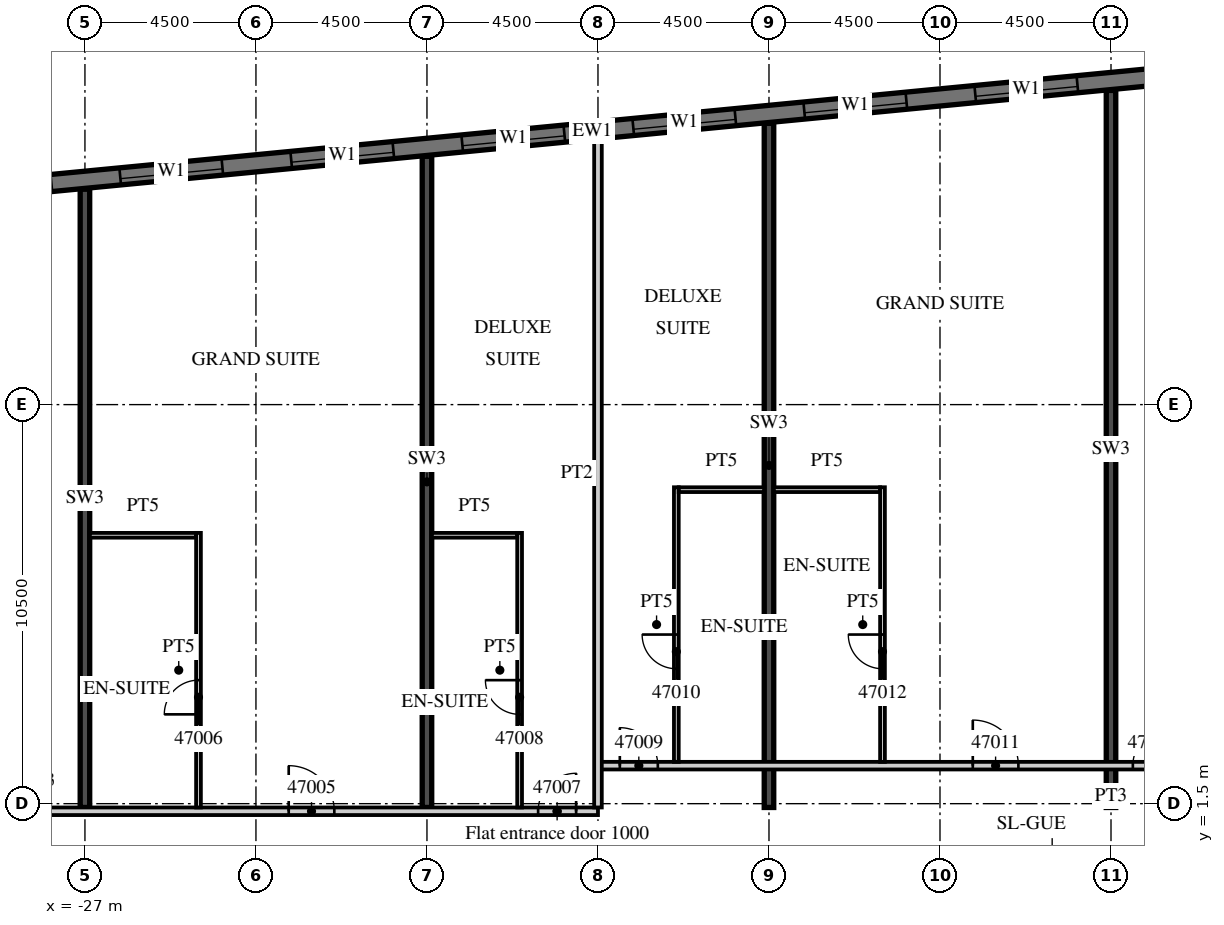
"""IFC4 building model, lengths in metres.
Left out: names, types, materials, properties, quantities, classifications, styles, units other than length and angle.
Written with IfcOpenShell. Run it as: python <this file> out.ifc"""

import sys

from ifc_helpers import new_model, si_unit, direction, frame, frame_2d, origin, place, context, subcontext, project, spatial, rectangle, extrude, element, fill, save


model = new_model("IFC4")
c1 = context("Model", 3, precision=1e-05, world=origin(), true_north=direction((0.0, 1.0)))
c2 = subcontext(c1, "Body", "Model", "MODEL_VIEW")
j1 = project(units=[si_unit("LENGTHUNIT", "METRE"), si_unit("PLANEANGLEUNIT", "RADIAN")], contexts=[c1])
p1 = place(None, origin())
s1 = spatial("IfcSite", under=j1, at=p1, CompositionType="ELEMENT")
p2 = place(p1, origin())
s2 = spatial("IfcBuilding", under=s1, at=p2, CompositionType="ELEMENT")
p3 = place(p2, frame((0.0, 0.0, 196.6)))
s3 = spatial("IfcBuildingStorey", under=s2, at=p3, CompositionType="ELEMENT", Elevation=196.6)
p4 = place(p3, frame((-27.0, 1.4, 0.0), z_axis=(0.0, 0.0, 1.0), x_axis=(0.0, 1.0, 0.0)))
e1 = element("IfcWall", 1, at=p4, inside=s3, PredefinedType="SHEAR", context=c2, shape_type="SweptSolid", body=[
    extrude(rectangle(XDim=16.268, YDim=0.25, at=frame_2d((8.134, 0.0))), origin(), (0.0, 0.0, 1.0), 3.3),
])
p5 = place(p3, frame((-18.0, 1.4, 0.0), z_axis=(0.0, 0.0, 1.0), x_axis=(0.0, 1.0, 0.0)))
e2 = element("IfcWall", 2, at=p5, inside=s3, PredefinedType="SHEAR", context=c2, shape_type="SweptSolid", body=[
    extrude(rectangle(XDim=17.134, YDim=0.25, at=frame_2d((8.567, 0.0))), origin(), (0.0, 0.0, 1.0), 3.3),
])
p6 = place(p3, frame((-9.0, 1.4, 0.0), z_axis=(0.0, 0.0, 1.0), x_axis=(0.0, 1.0, 0.0)))
e3 = element("IfcWall", 3, at=p6, inside=s3, PredefinedType="SHEAR", context=c2, shape_type="SweptSolid", body=[
    extrude(rectangle(XDim=18.001, YDim=0.25, at=frame_2d((9.0, 0.0))), origin(), (0.0, 0.0, 1.0), 3.3),
])
p7 = place(p3, frame((0.0, 1.4, 0.0), z_axis=(0.0, 0.0, 1.0), x_axis=(0.0, 1.0, 0.0)))
e4 = element("IfcWall", 4, at=p7, inside=s3, PredefinedType="SHEAR", context=c2, shape_type="SweptSolid", body=[
    extrude(rectangle(XDim=18.867, YDim=0.25, at=frame_2d((9.434, 0.0))), origin(), (0.0, 0.0, 1.0), 3.3),
])
p8 = place(p3, frame((13.521, 21.817, 0.0), z_axis=(0.0, 0.0, 1.0), x_axis=(-0.995396508751, -0.095842529008, 0.0)))
e5 = element("IfcWall", 5, at=p8, inside=s3, PredefinedType="SOLIDWALL", context=c2, shape_type="SweptSolid", body=[
    extrude(rectangle(XDim=54.591, YDim=0.45, at=frame_2d((27.296, 0.0))), origin(), (0.0, 0.0, 1.0), 3.02),
])
p9 = place(p8, frame((0.91, 0.0, 0.45)))
e6 = element("IfcOpeningElement", 6, at=p9, cuts=e5, PredefinedType="OPENING", context=c2, shape_type="SweptSolid", body=[
    extrude(rectangle(XDim=2.7, YDim=2.25, at=frame_2d((1.35, 1.125))), frame((0.0, 0.235, 0.0), z_axis=(0.0, -1.0, 0.0), x_axis=(1.0, 0.0, 0.0)), (0.0, 0.0, 1.0), 0.47),
])
p10 = place(p8, frame((5.431, 0.0, 0.45)))
e7 = element("IfcOpeningElement", 7, at=p10, cuts=e5, PredefinedType="OPENING", context=c2, shape_type="SweptSolid", body=[
    extrude(rectangle(XDim=2.7, YDim=2.25, at=frame_2d((1.35, 1.125))), frame((0.0, 0.235, 0.0), z_axis=(0.0, -1.0, 0.0), x_axis=(1.0, 0.0, 0.0)), (0.0, 0.0, 1.0), 0.47),
])
p11 = place(p8, frame((9.952, 0.0, 0.45)))
e8 = element("IfcOpeningElement", 8, at=p11, cuts=e5, PredefinedType="OPENING", context=c2, shape_type="SweptSolid", body=[
    extrude(rectangle(XDim=2.7, YDim=2.25, at=frame_2d((1.35, 1.125))), frame((0.0, 0.235, 0.0), z_axis=(0.0, -1.0, 0.0), x_axis=(1.0, 0.0, 0.0)), (0.0, 0.0, 1.0), 0.47),
])
p12 = place(p8, frame((14.473, 0.0, 0.45)))
e9 = element("IfcOpeningElement", 9, at=p12, cuts=e5, PredefinedType="OPENING", context=c2, shape_type="SweptSolid", body=[
    extrude(rectangle(XDim=2.7, YDim=2.25, at=frame_2d((1.35, 1.125))), frame((0.0, 0.235, 0.0), z_axis=(0.0, -1.0, 0.0), x_axis=(1.0, 0.0, 0.0)), (0.0, 0.0, 1.0), 0.47),
])
p13 = place(p8, frame((18.994, 0.0, 0.45)))
e10 = element("IfcOpeningElement", 10, at=p13, cuts=e5, PredefinedType="OPENING", context=c2, shape_type="SweptSolid", body=[
    extrude(rectangle(XDim=2.7, YDim=2.25, at=frame_2d((1.35, 1.125))), frame((0.0, 0.235, 0.0), z_axis=(0.0, -1.0, 0.0), x_axis=(1.0, 0.0, 0.0)), (0.0, 0.0, 1.0), 0.47),
])
p14 = place(p8, frame((23.514, 0.0, 0.45)))
e11 = element("IfcOpeningElement", 11, at=p14, cuts=e5, PredefinedType="OPENING", context=c2, shape_type="SweptSolid", body=[
    extrude(rectangle(XDim=2.7, YDim=2.25, at=frame_2d((1.35, 1.125))), frame((0.0, 0.235, 0.0), z_axis=(0.0, -1.0, 0.0), x_axis=(1.0, 0.0, 0.0)), (0.0, 0.0, 1.0), 0.47),
])
p15 = place(p8, frame((28.035, 0.0, 0.45)))
e12 = element("IfcOpeningElement", 12, at=p15, cuts=e5, PredefinedType="OPENING", context=c2, shape_type="SweptSolid", body=[
    extrude(rectangle(XDim=2.7, YDim=2.25, at=frame_2d((1.35, 1.125))), frame((0.0, 0.235, 0.0), z_axis=(0.0, -1.0, 0.0), x_axis=(1.0, 0.0, 0.0)), (0.0, 0.0, 1.0), 0.47),
])
p16 = place(p8, frame((32.556, 0.0, 0.45)))
e13 = element("IfcOpeningElement", 13, at=p16, cuts=e5, PredefinedType="OPENING", context=c2, shape_type="SweptSolid", body=[
    extrude(rectangle(XDim=2.7, YDim=2.25, at=frame_2d((1.35, 1.125))), frame((0.0, 0.235, 0.0), z_axis=(0.0, -1.0, 0.0), x_axis=(1.0, 0.0, 0.0)), (0.0, 0.0, 1.0), 0.47),
])
p17 = place(p8, frame((37.077, 0.0, 0.45)))
e14 = element("IfcOpeningElement", 14, at=p17, cuts=e5, PredefinedType="OPENING", context=c2, shape_type="SweptSolid", body=[
    extrude(rectangle(XDim=2.7, YDim=2.25, at=frame_2d((1.35, 1.125))), frame((0.0, 0.235, 0.0), z_axis=(0.0, -1.0, 0.0), x_axis=(1.0, 0.0, 0.0)), (0.0, 0.0, 1.0), 0.47),
])
p18 = place(p8, frame((41.598, 0.0, 0.45)))
e15 = element("IfcOpeningElement", 15, at=p18, cuts=e5, PredefinedType="OPENING", context=c2, shape_type="SweptSolid", body=[
    extrude(rectangle(XDim=2.7, YDim=2.25, at=frame_2d((1.35, 1.125))), frame((0.0, 0.235, 0.0), z_axis=(0.0, -1.0, 0.0), x_axis=(1.0, 0.0, 0.0)), (0.0, 0.0, 1.0), 0.47),
])
p19 = place(p8, frame((46.118, 0.0, 0.45)))
e16 = element("IfcOpeningElement", 16, at=p19, cuts=e5, PredefinedType="OPENING", context=c2, shape_type="SweptSolid", body=[
    extrude(rectangle(XDim=2.7, YDim=2.25, at=frame_2d((1.35, 1.125))), frame((0.0, 0.235, 0.0), z_axis=(0.0, -1.0, 0.0), x_axis=(1.0, 0.0, 0.0)), (0.0, 0.0, 1.0), 0.47),
])
p20 = place(p8, frame((50.629, 0.0, 0.45)))
e17 = element("IfcOpeningElement", 17, at=p20, cuts=e5, PredefinedType="OPENING", context=c2, shape_type="SweptSolid", body=[
    extrude(rectangle(XDim=2.7, YDim=2.25, at=frame_2d((1.35, 1.125))), frame((0.0, 0.235, 0.0), z_axis=(0.0, -1.0, 0.0), x_axis=(1.0, 0.0, 0.0)), (0.0, 0.0, 1.0), 0.47),
])
p21 = place(p3, frame((-42.913, 1.3, 0.0), z_axis=(0.0, 0.0, 1.0), x_axis=(1.0, 0.0, 0.0)))
e18 = element("IfcWall", 18, at=p21, inside=s3, PredefinedType="PARTITIONING", context=c2, shape_type="SweptSolid", body=[
    extrude(rectangle(XDim=29.413, YDim=0.2, at=frame_2d((14.707, 0.0))), origin(), (0.0, 0.0, 1.0), 3.02),
])
p22 = place(p21, frame((1.406, 0.0, 0.0)))
e19 = element("IfcOpeningElement", 19, at=p22, cuts=e18, PredefinedType="OPENING", context=c2, shape_type="SweptSolid", body=[
    extrude(rectangle(XDim=1.2, YDim=2.1, at=frame_2d((0.6, 1.05))), frame((0.0, 0.11, 0.0), z_axis=(0.0, -1.0, 0.0), x_axis=(1.0, 0.0, 0.0)), (0.0, 0.0, 1.0), 0.22),
])
p23 = place(p21, frame((12.275, 0.0, 0.0)))
e20 = element("IfcOpeningElement", 20, at=p23, cuts=e18, PredefinedType="OPENING", context=c2, shape_type="SweptSolid", body=[
    extrude(rectangle(XDim=1.2, YDim=2.1, at=frame_2d((0.6, 1.05))), frame((0.0, 0.11, 0.0), z_axis=(0.0, -1.0, 0.0), x_axis=(1.0, 0.0, 0.0)), (0.0, 0.0, 1.0), 0.22),
])
p24 = place(p21, frame((21.275, 0.0, 0.0)))
e21 = element("IfcOpeningElement", 21, at=p24, cuts=e18, PredefinedType="OPENING", context=c2, shape_type="SweptSolid", body=[
    extrude(rectangle(XDim=1.2, YDim=2.1, at=frame_2d((0.6, 1.05))), frame((0.0, 0.11, 0.0), z_axis=(0.0, -1.0, 0.0), x_axis=(1.0, 0.0, 0.0)), (0.0, 0.0, 1.0), 0.22),
])
p25 = place(p21, frame((27.838, 0.0, 0.0)))
e22 = element("IfcOpeningElement", 22, at=p25, cuts=e18, PredefinedType="OPENING", context=c2, shape_type="SweptSolid", body=[
    extrude(rectangle(XDim=1.0, YDim=2.1, at=frame_2d((0.5, 1.05))), frame((0.0, 0.11, 0.0), z_axis=(0.0, -1.0, 0.0), x_axis=(1.0, 0.0, 0.0)), (0.0, 0.0, 1.0), 0.22),
])
p26 = place(p3, frame((-13.5, 2.5, 0.0), z_axis=(0.0, 0.0, 1.0), x_axis=(1.0, 0.0, 0.0)))
e23 = element("IfcWall", 23, at=p26, inside=s3, PredefinedType="PARTITIONING", context=c2, shape_type="SweptSolid", body=[
    extrude(rectangle(XDim=27.0, YDim=0.2, at=frame_2d((13.5, 0.0))), origin(), (0.0, 0.0, 1.0), 3.02),
])
p27 = place(p26, frame((0.575, 0.0, 0.0)))
e24 = element("IfcOpeningElement", 24, at=p27, cuts=e23, PredefinedType="OPENING", context=c2, shape_type="SweptSolid", body=[
    extrude(rectangle(XDim=1.0, YDim=2.1, at=frame_2d((0.5, 1.05))), frame((0.0, 0.11, 0.0), z_axis=(0.0, -1.0, 0.0), x_axis=(1.0, 0.0, 0.0)), (0.0, 0.0, 1.0), 0.22),
])
p28 = place(p26, frame((9.863, 0.0, 0.0)))
e25 = element("IfcOpeningElement", 25, at=p28, cuts=e23, PredefinedType="OPENING", context=c2, shape_type="SweptSolid", body=[
    extrude(rectangle(XDim=1.2, YDim=2.1, at=frame_2d((0.6, 1.05))), frame((0.0, 0.11, 0.0), z_axis=(0.0, -1.0, 0.0), x_axis=(1.0, 0.0, 0.0)), (0.0, 0.0, 1.0), 0.22),
])
p29 = place(p26, frame((14.075, 0.0, 0.0)))
e26 = element("IfcOpeningElement", 26, at=p29, cuts=e23, PredefinedType="OPENING", context=c2, shape_type="SweptSolid", body=[
    extrude(rectangle(XDim=1.0, YDim=2.1, at=frame_2d((0.5, 1.05))), frame((0.0, 0.11, 0.0), z_axis=(0.0, -1.0, 0.0), x_axis=(1.0, 0.0, 0.0)), (0.0, 0.0, 1.0), 0.22),
])
p30 = place(p26, frame((18.55, 0.0, 0.0)))
e27 = element("IfcOpeningElement", 27, at=p30, cuts=e23, PredefinedType="OPENING", context=c2, shape_type="SweptSolid", body=[
    extrude(rectangle(XDim=1.0, YDim=2.1, at=frame_2d((0.5, 1.05))), frame((0.0, 0.11, 0.0), z_axis=(0.0, -1.0, 0.0), x_axis=(1.0, 0.0, 0.0)), (0.0, 0.0, 1.0), 0.22),
])
p31 = place(p26, frame((23.075, 0.0, 0.0)))
e28 = element("IfcOpeningElement", 28, at=p31, cuts=e23, PredefinedType="OPENING", context=c2, shape_type="SweptSolid", body=[
    extrude(rectangle(XDim=1.0, YDim=2.1, at=frame_2d((0.5, 1.05))), frame((0.0, 0.11, 0.0), z_axis=(0.0, -1.0, 0.0), x_axis=(1.0, 0.0, 0.0)), (0.0, 0.0, 1.0), 0.22),
])
p32 = place(p3, frame((-24.012, 1.4, 0.0), z_axis=(0.0, 0.0, 1.0), x_axis=(0.0, 1.0, 0.0)))
e29 = element("IfcWall", 29, at=p32, inside=s3, PredefinedType="PARTITIONING", context=c2, shape_type="SweptSolid", body=[
    extrude(rectangle(XDim=7.225, YDim=0.125, at=frame_2d((3.613, 0.0))), origin(), (0.0, 0.0, 1.0), 3.02),
])
p33 = place(p32, frame((2.45, 0.0, 0.0)))
e30 = element("IfcOpeningElement", 30, at=p33, cuts=e29, PredefinedType="OPENING", context=c2, shape_type="SweptSolid", body=[
    extrude(rectangle(XDim=0.9, YDim=2.1, at=frame_2d((0.45, 1.05))), frame((0.0, 0.073, 0.0), z_axis=(0.0, -1.0, 0.0), x_axis=(1.0, 0.0, 0.0)), (0.0, 0.0, 1.0), 0.145),
])
p34 = place(p3, frame((-26.875, 8.562, 0.0), z_axis=(0.0, 0.0, 1.0), x_axis=(1.0, 0.0, 0.0)))
e31 = element("IfcWall", 31, at=p34, inside=s3, PredefinedType="PARTITIONING", context=c2, shape_type="SweptSolid", body=[
    extrude(rectangle(XDim=2.8, YDim=0.125, at=frame_2d((1.4, 0.0))), origin(), (0.0, 0.0, 1.0), 3.02),
])
p35 = place(p3, frame((-13.5, 1.4, 0.0), z_axis=(0.0, 0.0, 1.0), x_axis=(0.0, 1.0, 0.0)))
e32 = element("IfcWall", 32, at=p35, inside=s3, PredefinedType="PARTITIONING", context=c2, shape_type="SweptSolid", body=[
    extrude(rectangle(XDim=17.59, YDim=0.2, at=frame_2d((8.795, 0.0))), origin(), (0.0, 0.0, 1.0), 3.02),
])
p36 = place(p3, frame((-15.562, 1.4, 0.0), z_axis=(0.0, 0.0, 1.0), x_axis=(0.0, 1.0, 0.0)))
e33 = element("IfcWall", 33, at=p36, inside=s3, PredefinedType="PARTITIONING", context=c2, shape_type="SweptSolid", body=[
    extrude(rectangle(XDim=7.225, YDim=0.125, at=frame_2d((3.613, 0.0))), origin(), (0.0, 0.0, 1.0), 3.02),
])
p37 = place(p36, frame((2.45, 0.0, 0.0)))
e34 = element("IfcOpeningElement", 34, at=p37, cuts=e33, PredefinedType="OPENING", context=c2, shape_type="SweptSolid", body=[
    extrude(rectangle(XDim=0.9, YDim=2.1, at=frame_2d((0.45, 1.05))), frame((0.0, 0.073, 0.0), z_axis=(0.0, -1.0, 0.0), x_axis=(1.0, 0.0, 0.0)), (0.0, 0.0, 1.0), 0.145),
])
p38 = place(p3, frame((-17.875, 8.562, 0.0), z_axis=(0.0, 0.0, 1.0), x_axis=(1.0, 0.0, 0.0)))
e35 = element("IfcWall", 35, at=p38, inside=s3, PredefinedType="PARTITIONING", context=c2, shape_type="SweptSolid", body=[
    extrude(rectangle(XDim=2.25, YDim=0.125, at=frame_2d((1.125, 0.0))), origin(), (0.0, 0.0, 1.0), 3.02),
])
p39 = place(p3, frame((-11.438, 2.6, 0.0), z_axis=(0.0, 0.0, 1.0), x_axis=(0.0, 1.0, 0.0)))
e36 = element("IfcWall", 36, at=p39, inside=s3, PredefinedType="PARTITIONING", context=c2, shape_type="SweptSolid", body=[
    extrude(rectangle(XDim=7.225, YDim=0.125, at=frame_2d((3.612, 0.0))), origin(), (0.0, 0.0, 1.0), 3.02),
])
p40 = place(p39, frame((2.45, 0.0, 0.0)))
e37 = element("IfcOpeningElement", 37, at=p40, cuts=e36, PredefinedType="OPENING", context=c2, shape_type="SweptSolid", body=[
    extrude(rectangle(XDim=0.9, YDim=2.1, at=frame_2d((0.45, 1.05))), frame((0.0, 0.073, 0.0), z_axis=(0.0, -1.0, 0.0), x_axis=(1.0, 0.0, 0.0)), (0.0, 0.0, 1.0), 0.145),
])
p41 = place(p3, frame((-11.375, 9.762, 0.0), z_axis=(0.0, 0.0, 1.0), x_axis=(1.0, 0.0, 0.0)))
e38 = element("IfcWall", 38, at=p41, inside=s3, PredefinedType="PARTITIONING", context=c2, shape_type="SweptSolid", body=[
    extrude(rectangle(XDim=2.25, YDim=0.125, at=frame_2d((1.125, 0.0))), origin(), (0.0, 0.0, 1.0), 3.02),
])
p42 = place(p3, frame((-6.013, 2.6, 0.0), z_axis=(0.0, 0.0, 1.0), x_axis=(0.0, 1.0, 0.0)))
e39 = element("IfcWall", 39, at=p42, inside=s3, PredefinedType="PARTITIONING", context=c2, shape_type="SweptSolid", body=[
    extrude(rectangle(XDim=7.225, YDim=0.125, at=frame_2d((3.612, 0.0))), origin(), (0.0, 0.0, 1.0), 3.02),
])
p43 = place(p42, frame((2.45, 0.0, 0.0)))
e40 = element("IfcOpeningElement", 40, at=p43, cuts=e39, PredefinedType="OPENING", context=c2, shape_type="SweptSolid", body=[
    extrude(rectangle(XDim=0.9, YDim=2.1, at=frame_2d((0.45, 1.05))), frame((0.0, 0.073, 0.0), z_axis=(0.0, -1.0, 0.0), x_axis=(1.0, 0.0, 0.0)), (0.0, 0.0, 1.0), 0.145),
])
p44 = place(p3, frame((-8.875, 9.762, 0.0), z_axis=(0.0, 0.0, 1.0), x_axis=(1.0, 0.0, 0.0)))
e41 = element("IfcWall", 41, at=p44, inside=s3, PredefinedType="PARTITIONING", context=c2, shape_type="SweptSolid", body=[
    extrude(rectangle(XDim=2.8, YDim=0.125, at=frame_2d((1.4, 0.0))), origin(), (0.0, 0.0, 1.0), 3.02),
])
p45 = place(p12, origin())
e42 = element("IfcWindow", 42, at=p45, inside=s3, PartitioningType="SINGLE_PANEL", PredefinedType="WINDOW", context=c2, shape_type="SweptSolid", body=[
    extrude(rectangle(XDim=2.7, YDim=2.25, at=frame_2d((1.35, 1.125))), frame((0.0, 0.09, 0.0), z_axis=(0.0, -1.0, 0.0), x_axis=(1.0, 0.0, 0.0)), (0.0, 0.0, 1.0), 0.06),
])
fill(e9, e42)
p46 = place(p13, origin())
e43 = element("IfcWindow", 43, at=p46, inside=s3, PartitioningType="SINGLE_PANEL", PredefinedType="WINDOW", context=c2, shape_type="SweptSolid", body=[
    extrude(rectangle(XDim=2.7, YDim=2.25, at=frame_2d((1.35, 1.125))), frame((0.0, 0.09, 0.0), z_axis=(0.0, -1.0, 0.0), x_axis=(1.0, 0.0, 0.0)), (0.0, 0.0, 1.0), 0.06),
])
fill(e10, e43)
p47 = place(p14, origin())
e44 = element("IfcWindow", 44, at=p47, inside=s3, PartitioningType="SINGLE_PANEL", PredefinedType="WINDOW", context=c2, shape_type="SweptSolid", body=[
    extrude(rectangle(XDim=2.7, YDim=2.25, at=frame_2d((1.35, 1.125))), frame((0.0, 0.09, 0.0), z_axis=(0.0, -1.0, 0.0), x_axis=(1.0, 0.0, 0.0)), (0.0, 0.0, 1.0), 0.06),
])
fill(e11, e44)
p48 = place(p15, origin())
e45 = element("IfcWindow", 45, at=p48, inside=s3, PartitioningType="SINGLE_PANEL", PredefinedType="WINDOW", context=c2, shape_type="SweptSolid", body=[
    extrude(rectangle(XDim=2.7, YDim=2.25, at=frame_2d((1.35, 1.125))), frame((0.0, 0.09, 0.0), z_axis=(0.0, -1.0, 0.0), x_axis=(1.0, 0.0, 0.0)), (0.0, 0.0, 1.0), 0.06),
])
fill(e12, e45)
p49 = place(p16, origin())
e46 = element("IfcWindow", 46, at=p49, inside=s3, PartitioningType="SINGLE_PANEL", PredefinedType="WINDOW", context=c2, shape_type="SweptSolid", body=[
    extrude(rectangle(XDim=2.7, YDim=2.25, at=frame_2d((1.35, 1.125))), frame((0.0, 0.09, 0.0), z_axis=(0.0, -1.0, 0.0), x_axis=(1.0, 0.0, 0.0)), (0.0, 0.0, 1.0), 0.06),
])
fill(e13, e46)
p50 = place(p17, origin())
e47 = element("IfcWindow", 47, at=p50, inside=s3, PartitioningType="SINGLE_PANEL", PredefinedType="WINDOW", context=c2, shape_type="SweptSolid", body=[
    extrude(rectangle(XDim=2.7, YDim=2.25, at=frame_2d((1.35, 1.125))), frame((0.0, 0.09, 0.0), z_axis=(0.0, -1.0, 0.0), x_axis=(1.0, 0.0, 0.0)), (0.0, 0.0, 1.0), 0.06),
])
fill(e14, e47)
p51 = place(p24, origin())
e48 = element("IfcDoor", 48, at=p51, inside=s3, OperationType="SINGLE_SWING_LEFT", PredefinedType="DOOR", context=c2, shape_type="SweptSolid", body=[
    extrude(rectangle(XDim=1.2, YDim=2.1, at=frame_2d((0.6, 1.05))), frame((0.0, 0.025, 0.0), z_axis=(0.0, -1.0, 0.0), x_axis=(1.0, 0.0, 0.0)), (0.0, 0.0, 1.0), 0.05),
])
fill(e21, e48)
p52 = place(p33, origin())
e49 = element("IfcDoor", 49, at=p52, inside=s3, OperationType="SINGLE_SWING_LEFT", PredefinedType="DOOR", context=c2, shape_type="SweptSolid", body=[
    extrude(rectangle(XDim=0.9, YDim=2.1, at=frame_2d((0.45, 1.05))), frame((0.0, 0.025, 0.0), z_axis=(0.0, -1.0, 0.0), x_axis=(1.0, 0.0, 0.0)), (0.0, 0.0, 1.0), 0.05),
])
fill(e30, e49)
p53 = place(p25, origin())
e50 = element("IfcDoor", 50, at=p53, inside=s3, OperationType="SINGLE_SWING_RIGHT", PredefinedType="DOOR", context=c2, shape_type="SweptSolid", body=[
    extrude(rectangle(XDim=1.0, YDim=2.1, at=frame_2d((0.5, 1.05))), frame((0.0, 0.025, 0.0), z_axis=(0.0, -1.0, 0.0), x_axis=(1.0, 0.0, 0.0)), (0.0, 0.0, 1.0), 0.05),
])
fill(e22, e50)
p54 = place(p37, origin())
e51 = element("IfcDoor", 51, at=p54, inside=s3, OperationType="SINGLE_SWING_RIGHT", PredefinedType="DOOR", context=c2, shape_type="SweptSolid", body=[
    extrude(rectangle(XDim=0.9, YDim=2.1, at=frame_2d((0.45, 1.05))), frame((0.0, 0.025, 0.0), z_axis=(0.0, -1.0, 0.0), x_axis=(1.0, 0.0, 0.0)), (0.0, 0.0, 1.0), 0.05),
])
fill(e34, e51)
p55 = place(p27, origin())
e52 = element("IfcDoor", 52, at=p55, inside=s3, OperationType="SINGLE_SWING_LEFT", PredefinedType="DOOR", context=c2, shape_type="SweptSolid", body=[
    extrude(rectangle(XDim=1.0, YDim=2.1, at=frame_2d((0.5, 1.05))), frame((0.0, 0.025, 0.0), z_axis=(0.0, -1.0, 0.0), x_axis=(1.0, 0.0, 0.0)), (0.0, 0.0, 1.0), 0.05),
])
fill(e24, e52)
p56 = place(p40, origin())
e53 = element("IfcDoor", 53, at=p56, inside=s3, OperationType="SINGLE_SWING_RIGHT", PredefinedType="DOOR", context=c2, shape_type="SweptSolid", body=[
    extrude(rectangle(XDim=0.9, YDim=2.1, at=frame_2d((0.45, 1.05))), frame((0.0, 0.025, 0.0), z_axis=(0.0, -1.0, 0.0), x_axis=(1.0, 0.0, 0.0)), (0.0, 0.0, 1.0), 0.05),
])
fill(e37, e53)
p57 = place(p28, origin())
e54 = element("IfcDoor", 54, at=p57, inside=s3, OperationType="SINGLE_SWING_LEFT", PredefinedType="DOOR", context=c2, shape_type="SweptSolid", body=[
    extrude(rectangle(XDim=1.2, YDim=2.1, at=frame_2d((0.6, 1.05))), frame((0.0, 0.025, 0.0), z_axis=(0.0, -1.0, 0.0), x_axis=(1.0, 0.0, 0.0)), (0.0, 0.0, 1.0), 0.05),
])
fill(e25, e54)
p58 = place(p43, origin())
e55 = element("IfcDoor", 55, at=p58, inside=s3, OperationType="SINGLE_SWING_RIGHT", PredefinedType="DOOR", context=c2, shape_type="SweptSolid", body=[
    extrude(rectangle(XDim=0.9, YDim=2.1, at=frame_2d((0.45, 1.05))), frame((0.0, 0.025, 0.0), z_axis=(0.0, -1.0, 0.0), x_axis=(1.0, 0.0, 0.0)), (0.0, 0.0, 1.0), 0.05),
])
fill(e40, e55)
p59 = place(p29, origin())
e56 = element("IfcDoor", 56, at=p59, inside=s3, OperationType="SINGLE_SWING_RIGHT", PredefinedType="DOOR", context=c2, shape_type="SweptSolid", body=[
    extrude(rectangle(XDim=1.0, YDim=2.1, at=frame_2d((0.5, 1.05))), frame((0.0, 0.025, 0.0), z_axis=(0.0, -1.0, 0.0), x_axis=(1.0, 0.0, 0.0)), (0.0, 0.0, 1.0), 0.05),
])
fill(e26, e56)
save(model, sys.argv[1])
